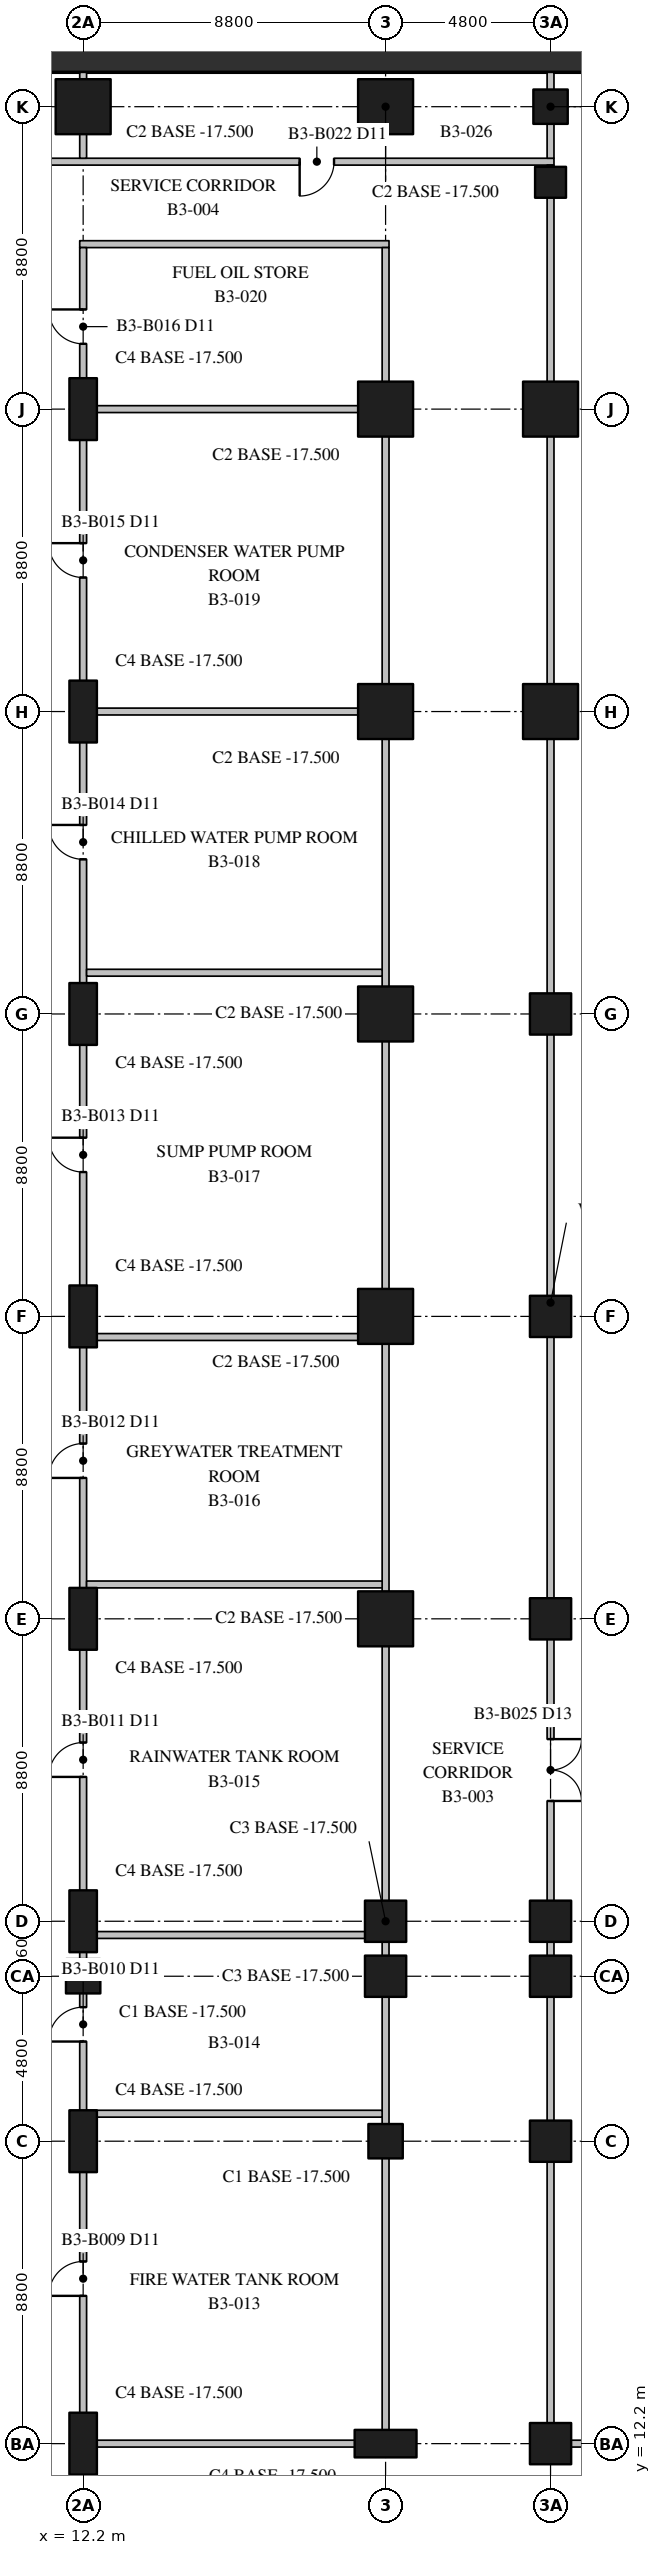
"""IFC4 building model, lengths in metres.
Left out: names, types, materials, properties, quantities, classifications, styles, units other than length and angle.
Written with IfcOpenShell. Run it as: python <this file> out.ifc"""

import sys

from ifc_helpers import new_model, si_unit, direction, frame, frame_2d, origin, origin_2d, place, context, subcontext, project, spatial, rectangle, extrude, element, fill, save


model = new_model("IFC4")
c1 = context("Model", 3, precision=1e-05, world=origin(), true_north=direction((0.0, 1.0)))
c2 = subcontext(c1, "Body", "Model", "MODEL_VIEW")
j1 = project(units=[si_unit("LENGTHUNIT", "METRE"), si_unit("PLANEANGLEUNIT", "RADIAN")], contexts=[c1])
p1 = place(None, origin())
s1 = spatial("IfcSite", under=j1, at=p1, CompositionType="ELEMENT")
p2 = place(p1, origin())
s2 = spatial("IfcBuilding", under=s1, at=p2, CompositionType="ELEMENT")
p3 = place(p2, frame((0.0, 0.0, -17.0)))
s3 = spatial("IfcBuildingStorey", under=s2, at=p3, CompositionType="ELEMENT", Elevation=-17.0)
for number, where, z_axis, x_axis in (
    (1, (12.2, 12.2, -0.5), (0.0, 0.0, 1.0), (0.0, 1.0, 0.0)),
    (2, (12.2, 21.0, -0.5), (0.0, 0.0, 1.0), (0.0, 1.0, 0.0)),
):
    element("IfcColumn", number, at=place(p3, frame(where, z_axis=z_axis, x_axis=x_axis)), inside=s3, PredefinedType="COLUMN", context=c2, shape_type="SweptSolid", body=[
        extrude(rectangle(XDim=1.8, YDim=0.8, at=origin_2d()), origin(), (0.0, 0.0, 1.0), 5.5),
    ])
p4 = place(p3, frame((12.2, 25.8, -0.5), z_axis=(0.0, 0.0, 1.0), x_axis=(1.0, 0.0, 0.0)))
e3 = element("IfcColumn", 3, at=p4, inside=s3, PredefinedType="COLUMN", context=c2, shape_type="SweptSolid", body=[
    extrude(rectangle(XDim=1.0, YDim=1.0, at=origin_2d()), origin(), (0.0, 0.0, 1.0), 5.5),
])
for number, where, z_axis, x_axis in (
    (4, (12.2, 27.4, -0.5), (0.0, 0.0, 1.0), (0.0, 1.0, 0.0)),
    (5, (12.2, 36.2, -0.5), (0.0, 0.0, 1.0), (0.0, 1.0, 0.0)),
    (6, (12.2, 45.0, -0.5), (0.0, 0.0, 1.0), (0.0, 1.0, 0.0)),
    (7, (12.2, 53.8, -0.5), (0.0, 0.0, 1.0), (0.0, 1.0, 0.0)),
    (8, (12.2, 62.6, -0.5), (0.0, 0.0, 1.0), (0.0, 1.0, 0.0)),
    (9, (12.2, 71.4, -0.5), (0.0, 0.0, 1.0), (0.0, 1.0, 0.0)),
):
    element("IfcColumn", number, at=place(p3, frame(where, z_axis=z_axis, x_axis=x_axis)), inside=s3, PredefinedType="COLUMN", context=c2, shape_type="SweptSolid", body=[
        extrude(rectangle(XDim=1.8, YDim=0.8, at=origin_2d()), origin(), (0.0, 0.0, 1.0), 5.5),
    ])
p5 = place(p3, frame((12.2, 80.2, -0.5), z_axis=(0.0, 0.0, 1.0), x_axis=(1.0, 0.0, 0.0)))
e10 = element("IfcColumn", 10, at=p5, inside=s3, PredefinedType="COLUMN", context=c2, shape_type="SweptSolid", body=[
    extrude(rectangle(XDim=1.6, YDim=1.6, at=origin_2d()), origin(), (0.0, 0.0, 1.0), 5.5),
])
p6 = place(p3, frame((21.0, 12.2, -0.5), z_axis=(0.0, 0.0, 1.0), x_axis=(1.0, 0.0, 0.0)))
e11 = element("IfcColumn", 11, at=p6, inside=s3, PredefinedType="COLUMN", context=c2, shape_type="SweptSolid", body=[
    extrude(rectangle(XDim=1.8, YDim=0.8, at=origin_2d()), origin(), (0.0, 0.0, 1.0), 5.5),
])
p7 = place(p3, frame((21.0, 21.0, -0.5), z_axis=(0.0, 0.0, 1.0), x_axis=(1.0, 0.0, 0.0)))
e12 = element("IfcColumn", 12, at=p7, inside=s3, PredefinedType="COLUMN", context=c2, shape_type="SweptSolid", body=[
    extrude(rectangle(XDim=1.0, YDim=1.0, at=origin_2d()), origin(), (0.0, 0.0, 1.0), 5.5),
])
for number, where, z_axis, x_axis in (
    (13, (21.0, 25.8, -0.5), (0.0, 0.0, 1.0), (1.0, 0.0, 0.0)),
    (14, (21.0, 27.4, -0.5), (0.0, 0.0, 1.0), (1.0, 0.0, 0.0)),
):
    element("IfcColumn", number, at=place(p3, frame(where, z_axis=z_axis, x_axis=x_axis)), inside=s3, PredefinedType="COLUMN", context=c2, shape_type="SweptSolid", body=[
        extrude(rectangle(XDim=1.2, YDim=1.2, at=origin_2d()), origin(), (0.0, 0.0, 1.0), 5.5),
    ])
for number, where, z_axis, x_axis in (
    (15, (21.0, 36.2, -0.5), (0.0, 0.0, 1.0), (1.0, 0.0, 0.0)),
    (16, (21.0, 45.0, -0.5), (0.0, 0.0, 1.0), (1.0, 0.0, 0.0)),
    (17, (21.0, 53.8, -0.5), (0.0, 0.0, 1.0), (1.0, 0.0, 0.0)),
    (18, (21.0, 62.6, -0.5), (0.0, 0.0, 1.0), (1.0, 0.0, 0.0)),
    (19, (21.0, 71.4, -0.5), (0.0, 0.0, 1.0), (1.0, 0.0, 0.0)),
    (20, (21.0, 80.2, -0.5), (0.0, 0.0, 1.0), (1.0, 0.0, 0.0)),
):
    element("IfcColumn", number, at=place(p3, frame(where, z_axis=z_axis, x_axis=x_axis)), inside=s3, PredefinedType="COLUMN", context=c2, shape_type="SweptSolid", body=[
        extrude(rectangle(XDim=1.6, YDim=1.6, at=origin_2d()), origin(), (0.0, 0.0, 1.0), 5.5),
    ])
for number, where, z_axis, x_axis in (
    (21, (25.8, 12.2, -0.5), (0.0, 0.0, 1.0), (1.0, 0.0, 0.0)),
    (22, (25.8, 21.0, -0.5), (0.0, 0.0, 1.0), (1.0, 0.0, 0.0)),
    (23, (25.8, 25.8, -0.5), (0.0, 0.0, 1.0), (1.0, 0.0, 0.0)),
    (24, (25.8, 27.4, -0.5), (0.0, 0.0, 1.0), (1.0, 0.0, 0.0)),
    (25, (25.8, 36.2, -0.5), (0.0, 0.0, 1.0), (1.0, 0.0, 0.0)),
    (26, (25.8, 45.0, -0.5), (0.0, 0.0, 1.0), (1.0, 0.0, 0.0)),
    (27, (25.8, 53.8, -0.5), (0.0, 0.0, 1.0), (1.0, 0.0, 0.0)),
):
    element("IfcColumn", number, at=place(p3, frame(where, z_axis=z_axis, x_axis=x_axis)), inside=s3, PredefinedType="COLUMN", context=c2, shape_type="SweptSolid", body=[
        extrude(rectangle(XDim=1.2, YDim=1.2, at=origin_2d()), origin(), (0.0, 0.0, 1.0), 5.5),
    ])
for number, where, z_axis, x_axis in (
    (28, (25.8, 62.6, -0.5), (0.0, 0.0, 1.0), (1.0, 0.0, 0.0)),
    (29, (25.8, 71.4, -0.5), (0.0, 0.0, 1.0), (1.0, 0.0, 0.0)),
):
    element("IfcColumn", number, at=place(p3, frame(where, z_axis=z_axis, x_axis=x_axis)), inside=s3, PredefinedType="COLUMN", context=c2, shape_type="SweptSolid", body=[
        extrude(rectangle(XDim=1.6, YDim=1.6, at=origin_2d()), origin(), (0.0, 0.0, 1.0), 5.5),
    ])
p8 = place(p3, frame((25.8, 80.2, -0.5), z_axis=(0.0, 0.0, 1.0), x_axis=(1.0, 0.0, 0.0)))
e30 = element("IfcColumn", 30, at=p8, inside=s3, PredefinedType="COLUMN", context=c2, shape_type="SweptSolid", body=[
    extrude(rectangle(XDim=1.0, YDim=1.0, at=origin_2d()), origin(), (0.0, 0.0, 1.0), 5.5),
])
p9 = place(p3, frame((25.8, 78.0, -0.5), z_axis=(0.0, 0.0, 1.0), x_axis=(1.0, 0.0, 0.0)))
e31 = element("IfcColumn", 31, at=p9, inside=s3, PredefinedType="COLUMN", context=c2, shape_type="SweptSolid", body=[
    extrude(rectangle(XDim=0.9, YDim=0.9, at=origin_2d()), origin(), (0.0, 0.0, 1.0), 5.5),
])
p10 = place(p3, frame((1.4, 81.6, -0.5), z_axis=(0.0, 0.0, 1.0), x_axis=(1.0, 0.0, 0.0)))
e32 = element("IfcWall", 32, at=p10, inside=s3, PredefinedType="SHEAR", context=c2, shape_type="SweptSolid", body=[
    extrude(rectangle(XDim=78.0, YDim=0.8, at=frame_2d((39.0, 0.0))), origin(), (0.0, 0.0, 1.0), 5.5),
])
p11 = place(p3, frame((12.1, 12.2, 0.0), z_axis=(0.0, 0.0, 1.0), x_axis=(1.0, 0.0, 0.0)))
e33 = element("IfcWall", 33, at=p11, inside=s3, PredefinedType="PARTITIONING", context=c2, shape_type="SweptSolid", body=[
    extrude(rectangle(XDim=9.0, YDim=0.2, at=frame_2d((4.5, 0.0))), origin(), (0.0, 0.0, 1.0), 4.6),
])
p12 = place(p3, frame((25.7, 12.2, 0.0), z_axis=(0.0, 0.0, 1.0), x_axis=(1.0, 0.0, 0.0)))
e34 = element("IfcWall", 34, at=p12, inside=s3, PredefinedType="PARTITIONING", context=c2, shape_type="SweptSolid", body=[
    extrude(rectangle(XDim=20.55, YDim=0.2, at=frame_2d((10.275, 0.0))), origin(), (0.0, 0.0, 1.0), 4.6),
])
p13 = place(p12, frame((4.312, 0.0, 0.0)))
e35 = element("IfcOpeningElement", 35, at=p13, cuts=e34, PredefinedType="OPENING", context=c2, shape_type="SweptSolid", body=[
    extrude(rectangle(XDim=1.8, YDim=2.1, at=frame_2d((0.9, 1.05))), frame((0.0, 0.11, 0.0), z_axis=(0.0, -1.0, 0.0), x_axis=(1.0, 0.0, 0.0)), (0.0, 0.0, 1.0), 0.22),
])
p14 = place(p12, frame((15.56, 0.0, 0.0)))
e36 = element("IfcOpeningElement", 36, at=p14, cuts=e34, PredefinedType="OPENING", context=c2, shape_type="SweptSolid", body=[
    extrude(rectangle(XDim=1.8, YDim=2.1, at=frame_2d((0.9, 1.05))), frame((0.0, 0.11, 0.0), z_axis=(0.0, -1.0, 0.0), x_axis=(1.0, 0.0, 0.0)), (0.0, 0.0, 1.0), 0.22),
])
p15 = place(p3, frame((12.1, 76.2, 0.0), z_axis=(0.0, 0.0, 1.0), x_axis=(1.0, 0.0, 0.0)))
e37 = element("IfcWall", 37, at=p15, inside=s3, PredefinedType="PARTITIONING", context=c2, shape_type="SweptSolid", body=[
    extrude(rectangle(XDim=9.0, YDim=0.2, at=frame_2d((4.5, 0.0))), origin(), (0.0, 0.0, 1.0), 4.6),
])
p16 = place(p3, frame((2.2, 78.6, 0.0), z_axis=(0.0, 0.0, 1.0), x_axis=(1.0, 0.0, 0.0)))
e38 = element("IfcWall", 38, at=p16, inside=s3, PredefinedType="PARTITIONING", context=c2, shape_type="SweptSolid", body=[
    extrude(rectangle(XDim=23.7, YDim=0.2, at=frame_2d((11.85, 0.0))), origin(), (0.0, 0.0, 1.0), 4.6),
])
p17 = place(p16, frame((4.5, 0.0, 0.0)))
e39 = element("IfcOpeningElement", 39, at=p17, cuts=e38, PredefinedType="OPENING", context=c2, shape_type="SweptSolid", body=[
    extrude(rectangle(XDim=1.0, YDim=2.1, at=frame_2d((0.5, 1.05))), frame((0.0, 0.11, 0.0), z_axis=(0.0, -1.0, 0.0), x_axis=(1.0, 0.0, 0.0)), (0.0, 0.0, 1.0), 0.22),
])
p18 = place(p16, frame((16.3, 0.0, 0.0)))
e40 = element("IfcOpeningElement", 40, at=p18, cuts=e38, PredefinedType="OPENING", context=c2, shape_type="SweptSolid", body=[
    extrude(rectangle(XDim=1.0, YDim=2.1, at=frame_2d((0.5, 1.05))), frame((0.0, 0.11, 0.0), z_axis=(0.0, -1.0, 0.0), x_axis=(1.0, 0.0, 0.0)), (0.0, 0.0, 1.0), 0.22),
])
for number, where, z_axis, x_axis in (
    (41, (12.3, 21.8, 0.0), (0.0, 0.0, 1.0), (1.0, 0.0, 0.0)),
    (42, (12.3, 27.0, 0.0), (0.0, 0.0, 1.0), (1.0, 0.0, 0.0)),
    (43, (12.3, 37.2, 0.0), (0.0, 0.0, 1.0), (1.0, 0.0, 0.0)),
    (44, (12.3, 44.4, 0.0), (0.0, 0.0, 1.0), (1.0, 0.0, 0.0)),
    (45, (12.3, 55.0, 0.0), (0.0, 0.0, 1.0), (1.0, 0.0, 0.0)),
    (46, (12.3, 62.6, 0.0), (0.0, 0.0, 1.0), (1.0, 0.0, 0.0)),
    (47, (12.3, 71.4, 0.0), (0.0, 0.0, 1.0), (1.0, 0.0, 0.0)),
):
    element("IfcWall", number, at=place(p3, frame(where, z_axis=z_axis, x_axis=x_axis)), inside=s3, PredefinedType="PARTITIONING", context=c2, shape_type="SweptSolid", body=[
        extrude(rectangle(XDim=8.6, YDim=0.2, at=frame_2d((4.3, 0.0))), origin(), (0.0, 0.0, 1.0), 4.6),
    ])
p19 = place(p3, frame((12.2, 12.3, 0.0), z_axis=(0.0, 0.0, 1.0), x_axis=(0.0, 1.0, 0.0)))
e48 = element("IfcWall", 48, at=p19, inside=s3, PredefinedType="PARTITIONING", context=c2, shape_type="SweptSolid", body=[
    extrude(rectangle(XDim=63.8, YDim=0.2, at=frame_2d((31.9, 0.0))), origin(), (0.0, 0.0, 1.0), 4.6),
])
p20 = place(p19, frame((4.2, 0.0, 0.0)))
e49 = element("IfcOpeningElement", 49, at=p20, cuts=e48, PredefinedType="OPENING", context=c2, shape_type="SweptSolid", body=[
    extrude(rectangle(XDim=1.0, YDim=2.1, at=frame_2d((0.5, 1.05))), frame((0.0, 0.11, 0.0), z_axis=(0.0, -1.0, 0.0), x_axis=(1.0, 0.0, 0.0)), (0.0, 0.0, 1.0), 0.22),
])
p21 = place(p19, frame((11.6, 0.0, 0.0)))
e50 = element("IfcOpeningElement", 50, at=p21, cuts=e48, PredefinedType="OPENING", context=c2, shape_type="SweptSolid", body=[
    extrude(rectangle(XDim=1.0, YDim=2.1, at=frame_2d((0.5, 1.05))), frame((0.0, 0.11, 0.0), z_axis=(0.0, -1.0, 0.0), x_axis=(1.0, 0.0, 0.0)), (0.0, 0.0, 1.0), 0.22),
])
p22 = place(p19, frame((19.3, 0.0, 0.0)))
e51 = element("IfcOpeningElement", 51, at=p22, cuts=e48, PredefinedType="OPENING", context=c2, shape_type="SweptSolid", body=[
    extrude(rectangle(XDim=1.0, YDim=2.1, at=frame_2d((0.5, 1.05))), frame((0.0, 0.11, 0.0), z_axis=(0.0, -1.0, 0.0), x_axis=(1.0, 0.0, 0.0)), (0.0, 0.0, 1.0), 0.22),
])
p23 = place(p19, frame((28.0, 0.0, 0.0)))
e52 = element("IfcOpeningElement", 52, at=p23, cuts=e48, PredefinedType="OPENING", context=c2, shape_type="SweptSolid", body=[
    extrude(rectangle(XDim=1.0, YDim=2.1, at=frame_2d((0.5, 1.05))), frame((0.0, 0.11, 0.0), z_axis=(0.0, -1.0, 0.0), x_axis=(1.0, 0.0, 0.0)), (0.0, 0.0, 1.0), 0.22),
])
p24 = place(p19, frame((36.9, 0.0, 0.0)))
e53 = element("IfcOpeningElement", 53, at=p24, cuts=e48, PredefinedType="OPENING", context=c2, shape_type="SweptSolid", body=[
    extrude(rectangle(XDim=1.0, YDim=2.1, at=frame_2d((0.5, 1.05))), frame((0.0, 0.11, 0.0), z_axis=(0.0, -1.0, 0.0), x_axis=(1.0, 0.0, 0.0)), (0.0, 0.0, 1.0), 0.22),
])
p25 = place(p19, frame((46.0, 0.0, 0.0)))
e54 = element("IfcOpeningElement", 54, at=p25, cuts=e48, PredefinedType="OPENING", context=c2, shape_type="SweptSolid", body=[
    extrude(rectangle(XDim=1.0, YDim=2.1, at=frame_2d((0.5, 1.05))), frame((0.0, 0.11, 0.0), z_axis=(0.0, -1.0, 0.0), x_axis=(1.0, 0.0, 0.0)), (0.0, 0.0, 1.0), 0.22),
])
p26 = place(p19, frame((54.2, 0.0, 0.0)))
e55 = element("IfcOpeningElement", 55, at=p26, cuts=e48, PredefinedType="OPENING", context=c2, shape_type="SweptSolid", body=[
    extrude(rectangle(XDim=1.0, YDim=2.1, at=frame_2d((0.5, 1.05))), frame((0.0, 0.11, 0.0), z_axis=(0.0, -1.0, 0.0), x_axis=(1.0, 0.0, 0.0)), (0.0, 0.0, 1.0), 0.22),
])
p27 = place(p19, frame((61.0, 0.0, 0.0)))
e56 = element("IfcOpeningElement", 56, at=p27, cuts=e48, PredefinedType="OPENING", context=c2, shape_type="SweptSolid", body=[
    extrude(rectangle(XDim=1.0, YDim=2.1, at=frame_2d((0.5, 1.05))), frame((0.0, 0.11, 0.0), z_axis=(0.0, -1.0, 0.0), x_axis=(1.0, 0.0, 0.0)), (0.0, 0.0, 1.0), 0.22),
])
p28 = place(p3, frame((12.2, 78.7, 0.0), z_axis=(0.0, 0.0, 1.0), x_axis=(0.0, 1.0, 0.0)))
e57 = element("IfcWall", 57, at=p28, inside=s3, PredefinedType="PARTITIONING", context=c2, shape_type="SweptSolid", body=[
    extrude(rectangle(XDim=2.5, YDim=0.2, at=frame_2d((1.25, 0.0))), origin(), (0.0, 0.0, 1.0), 4.6),
])
p29 = place(p3, frame((21.0, 12.3, 0.0), z_axis=(0.0, 0.0, 1.0), x_axis=(0.0, 1.0, 0.0)))
e58 = element("IfcWall", 58, at=p29, inside=s3, PredefinedType="PARTITIONING", context=c2, shape_type="SweptSolid", body=[
    extrude(rectangle(XDim=63.8, YDim=0.2, at=frame_2d((31.9, 0.0))), origin(), (0.0, 0.0, 1.0), 4.6),
])
p30 = place(p3, frame((25.8, 12.3, 0.0), z_axis=(0.0, 0.0, 1.0), x_axis=(0.0, 1.0, 0.0)))
e59 = element("IfcWall", 59, at=p30, inside=s3, PredefinedType="PARTITIONING", context=c2, shape_type="SweptSolid", body=[
    extrude(rectangle(XDim=66.2, YDim=0.2, at=frame_2d((33.1, 0.0))), origin(), (0.0, 0.0, 1.0), 4.6),
])
p31 = place(p30, frame((18.6, 0.0, 0.0)))
e60 = element("IfcOpeningElement", 60, at=p31, cuts=e59, PredefinedType="OPENING", context=c2, shape_type="SweptSolid", body=[
    extrude(rectangle(XDim=1.8, YDim=2.1, at=frame_2d((0.9, 1.05))), frame((0.0, 0.11, 0.0), z_axis=(0.0, -1.0, 0.0), x_axis=(1.0, 0.0, 0.0)), (0.0, 0.0, 1.0), 0.22),
])
p32 = place(p3, frame((25.8, 78.7, 0.0), z_axis=(0.0, 0.0, 1.0), x_axis=(0.0, 1.0, 0.0)))
e61 = element("IfcWall", 61, at=p32, inside=s3, PredefinedType="PARTITIONING", context=c2, shape_type="SweptSolid", body=[
    extrude(rectangle(XDim=2.5, YDim=0.2, at=frame_2d((1.25, 0.0))), origin(), (0.0, 0.0, 1.0), 4.6),
])
p33 = place(p20, origin())
e62 = element("IfcDoor", 62, at=p33, inside=s3, OperationType="SINGLE_SWING_LEFT", PredefinedType="DOOR", context=c2, shape_type="SweptSolid", body=[
    extrude(rectangle(XDim=1.0, YDim=2.1, at=frame_2d((0.5, 1.05))), frame((0.0, 0.025, 0.0), z_axis=(0.0, -1.0, 0.0), x_axis=(1.0, 0.0, 0.0)), (0.0, 0.0, 1.0), 0.05),
])
fill(e49, e62)
p34 = place(p21, origin())
e63 = element("IfcDoor", 63, at=p34, inside=s3, OperationType="SINGLE_SWING_LEFT", PredefinedType="DOOR", context=c2, shape_type="SweptSolid", body=[
    extrude(rectangle(XDim=1.0, YDim=2.1, at=frame_2d((0.5, 1.05))), frame((0.0, 0.025, 0.0), z_axis=(0.0, -1.0, 0.0), x_axis=(1.0, 0.0, 0.0)), (0.0, 0.0, 1.0), 0.05),
])
fill(e50, e63)
p35 = place(p22, origin())
e64 = element("IfcDoor", 64, at=p35, inside=s3, OperationType="SINGLE_SWING_LEFT", PredefinedType="DOOR", context=c2, shape_type="SweptSolid", body=[
    extrude(rectangle(XDim=1.0, YDim=2.1, at=frame_2d((0.5, 1.05))), frame((0.0, 0.025, 0.0), z_axis=(0.0, -1.0, 0.0), x_axis=(1.0, 0.0, 0.0)), (0.0, 0.0, 1.0), 0.05),
])
fill(e51, e64)
p36 = place(p23, origin())
e65 = element("IfcDoor", 65, at=p36, inside=s3, OperationType="SINGLE_SWING_LEFT", PredefinedType="DOOR", context=c2, shape_type="SweptSolid", body=[
    extrude(rectangle(XDim=1.0, YDim=2.1, at=frame_2d((0.5, 1.05))), frame((0.0, 0.025, 0.0), z_axis=(0.0, -1.0, 0.0), x_axis=(1.0, 0.0, 0.0)), (0.0, 0.0, 1.0), 0.05),
])
fill(e52, e65)
p37 = place(p24, origin())
e66 = element("IfcDoor", 66, at=p37, inside=s3, OperationType="SINGLE_SWING_RIGHT", PredefinedType="DOOR", context=c2, shape_type="SweptSolid", body=[
    extrude(rectangle(XDim=1.0, YDim=2.1, at=frame_2d((0.5, 1.05))), frame((0.0, 0.025, 0.0), z_axis=(0.0, -1.0, 0.0), x_axis=(1.0, 0.0, 0.0)), (0.0, 0.0, 1.0), 0.05),
])
fill(e53, e66)
p38 = place(p25, origin())
e67 = element("IfcDoor", 67, at=p38, inside=s3, OperationType="SINGLE_SWING_RIGHT", PredefinedType="DOOR", context=c2, shape_type="SweptSolid", body=[
    extrude(rectangle(XDim=1.0, YDim=2.1, at=frame_2d((0.5, 1.05))), frame((0.0, 0.025, 0.0), z_axis=(0.0, -1.0, 0.0), x_axis=(1.0, 0.0, 0.0)), (0.0, 0.0, 1.0), 0.05),
])
fill(e54, e67)
p39 = place(p26, origin())
e68 = element("IfcDoor", 68, at=p39, inside=s3, OperationType="SINGLE_SWING_RIGHT", PredefinedType="DOOR", context=c2, shape_type="SweptSolid", body=[
    extrude(rectangle(XDim=1.0, YDim=2.1, at=frame_2d((0.5, 1.05))), frame((0.0, 0.025, 0.0), z_axis=(0.0, -1.0, 0.0), x_axis=(1.0, 0.0, 0.0)), (0.0, 0.0, 1.0), 0.05),
])
fill(e55, e68)
p40 = place(p27, origin())
e69 = element("IfcDoor", 69, at=p40, inside=s3, OperationType="SINGLE_SWING_RIGHT", PredefinedType="DOOR", context=c2, shape_type="SweptSolid", body=[
    extrude(rectangle(XDim=1.0, YDim=2.1, at=frame_2d((0.5, 1.05))), frame((0.0, 0.025, 0.0), z_axis=(0.0, -1.0, 0.0), x_axis=(1.0, 0.0, 0.0)), (0.0, 0.0, 1.0), 0.05),
])
fill(e56, e69)
p41 = place(p18, frame((1.0, 0.0, 0.0), z_axis=(0.0, 0.0, 1.0), x_axis=(-1.0, 0.0, 0.0)))
e70 = element("IfcDoor", 70, at=p41, inside=s3, OperationType="SINGLE_SWING_LEFT", PredefinedType="DOOR", context=c2, shape_type="SweptSolid", body=[
    extrude(rectangle(XDim=1.0, YDim=2.1, at=frame_2d((0.5, 1.05))), frame((0.0, 0.025, 0.0), z_axis=(0.0, -1.0, 0.0), x_axis=(1.0, 0.0, 0.0)), (0.0, 0.0, 1.0), 0.05),
])
fill(e40, e70)
p42 = place(p31, frame((1.8, 0.0, 0.0), z_axis=(0.0, 0.0, 1.0), x_axis=(-1.0, 0.0, 0.0)))
e71 = element("IfcDoor", 71, at=p42, inside=s3, OperationType="DOUBLE_DOOR_SINGLE_SWING", PredefinedType="DOOR", context=c2, shape_type="SweptSolid", body=[
    extrude(rectangle(XDim=1.8, YDim=2.1, at=frame_2d((0.9, 1.05))), frame((0.0, 0.025, 0.0), z_axis=(0.0, -1.0, 0.0), x_axis=(1.0, 0.0, 0.0)), (0.0, 0.0, 1.0), 0.05),
])
fill(e60, e71)
save(model, sys.argv[1])
